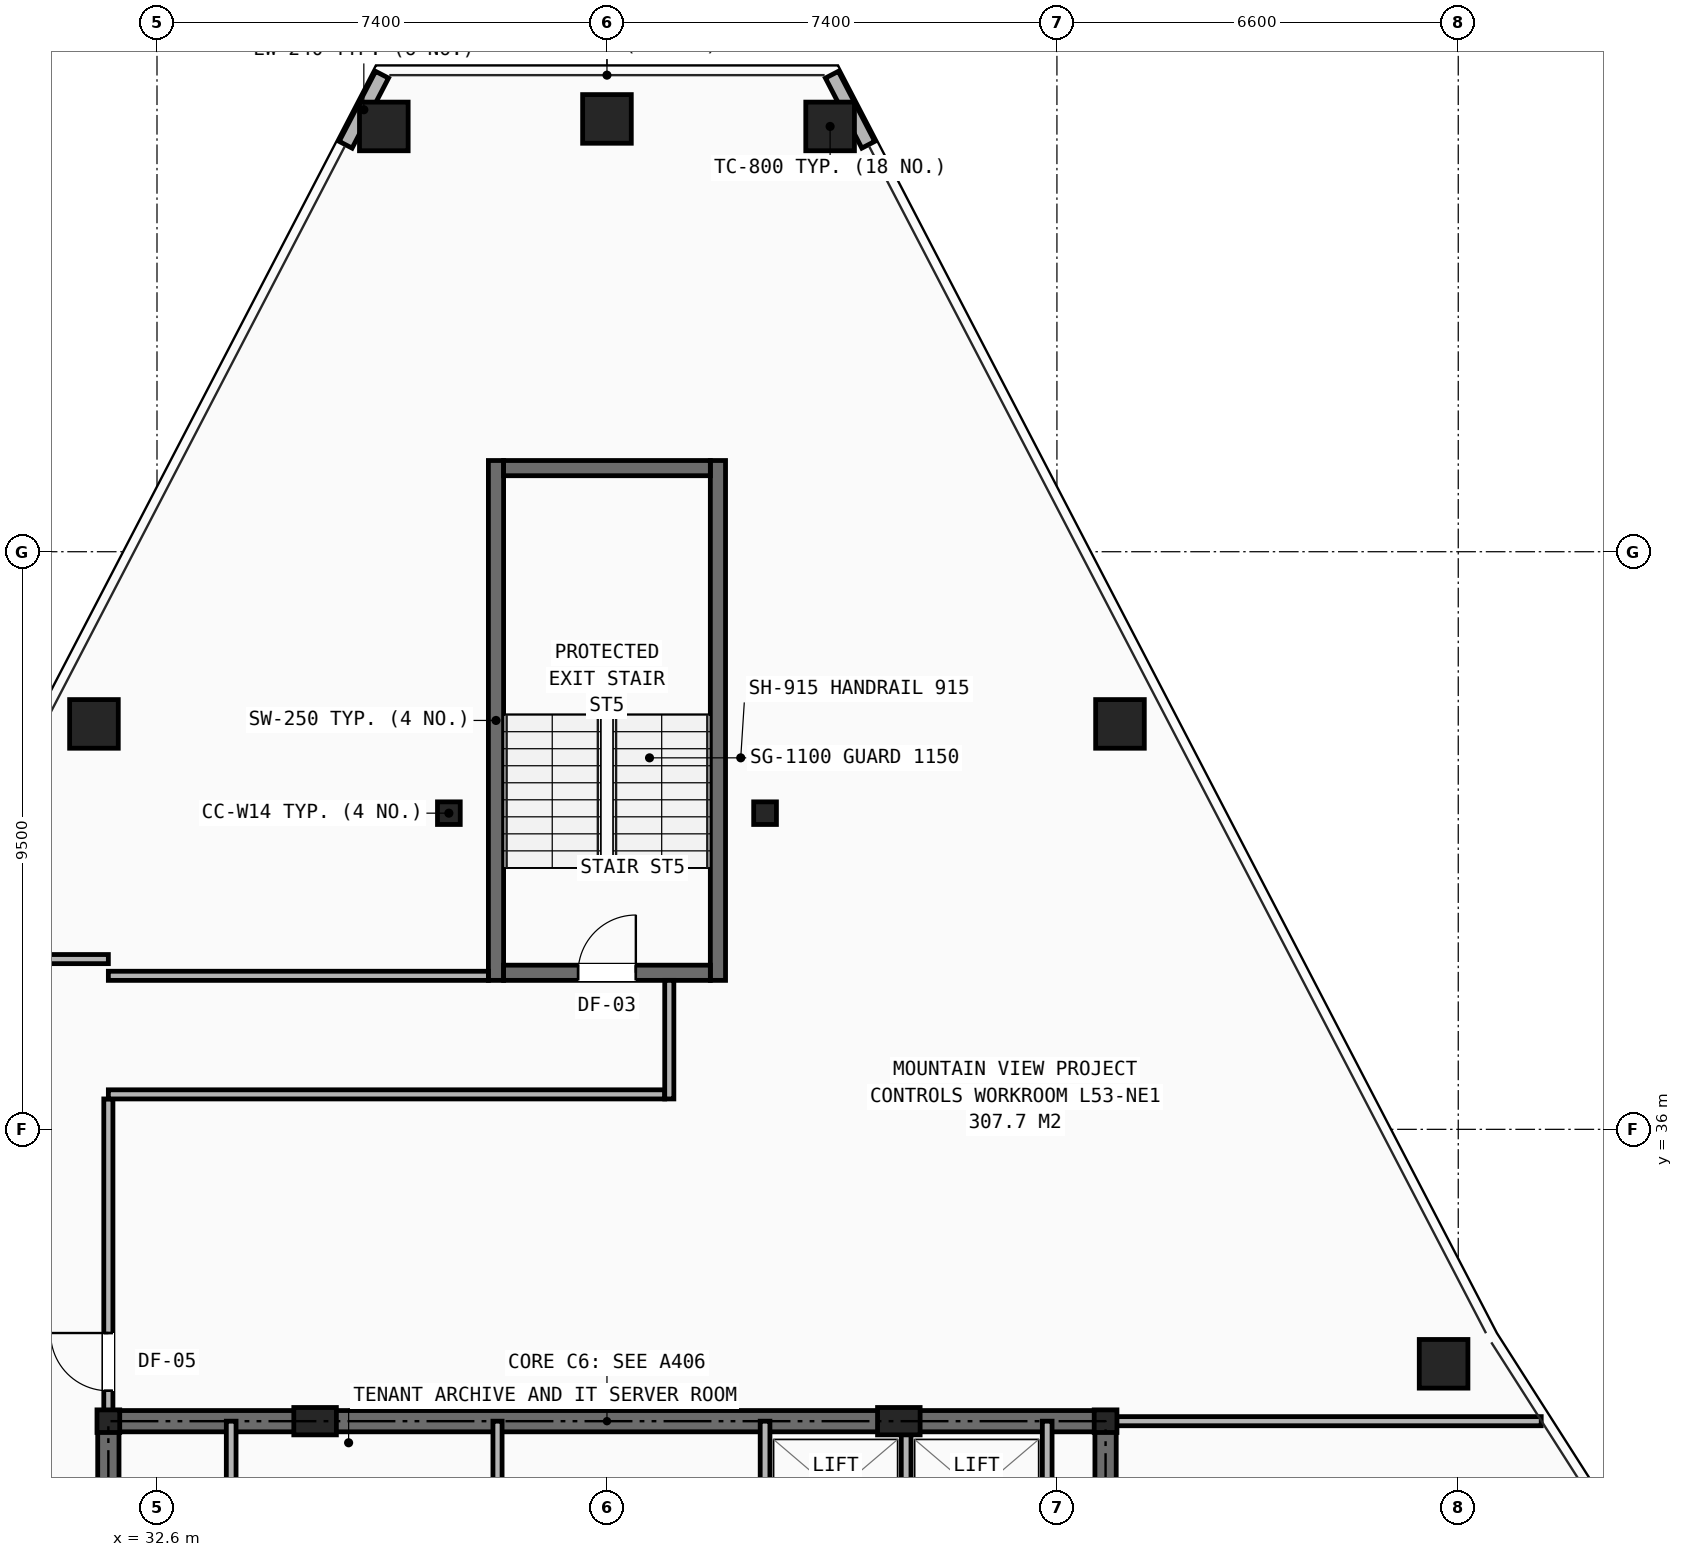
"""IFC4 building model, lengths in metres.
Left out: names, types, materials, properties, quantities, classifications, styles, units other than length and angle.
Written with IfcOpenShell. Run it as: python <this file> out.ifc"""

import sys

from ifc_helpers import new_model, si_unit, direction, frame, frame_2d, origin, origin_2d, place, context, subcontext, project, spatial, rectangle, hollow_rectangle, i_section, extrude, element, fill, save


model = new_model("IFC4")
c1 = context("Model", 3, precision=1e-05, world=origin(), true_north=direction((0.0, 1.0)))
c2 = subcontext(c1, "Body", "Model", "MODEL_VIEW")
j1 = project(units=[si_unit("LENGTHUNIT", "METRE"), si_unit("PLANEANGLEUNIT", "RADIAN")], contexts=[c1])
p1 = place(None, origin())
s1 = spatial("IfcSite", under=j1, at=p1, CompositionType="ELEMENT")
p2 = place(p1, origin())
s2 = spatial("IfcBuilding", under=s1, at=p2, CompositionType="ELEMENT")
p3 = place(p2, frame((0.0, 0.0, 186.15)))
s3 = spatial("IfcBuildingStorey", under=s2, at=p3, CompositionType="ELEMENT", Elevation=186.15)
for number, where, z_axis, x_axis in (
    (1, (31.8, 31.2, 0.0), (0.0, 0.0, 1.0), (1.0, 0.0, 0.0)),
    (2, (48.2, 31.2, 0.0), (0.0, 0.0, 1.0), (1.0, 0.0, 0.0)),
    (3, (37.4, 41.2, 0.0), (0.0, 0.0, 1.0), (1.0, 0.0, 0.0)),
    (4, (42.6, 41.2, 0.0), (0.0, 0.0, 1.0), (1.0, 0.0, 0.0)),
):
    element("IfcColumn", number, at=place(p3, frame(where, z_axis=z_axis, x_axis=x_axis)), inside=s3, PredefinedType="COLUMN", context=c2, shape_type="SweptSolid", body=[
        extrude(i_section(OverallWidth=0.374, OverallDepth=0.372, WebThickness=0.016, FlangeThickness=0.026, at=origin_2d()), origin(), (0.0, 0.0, 1.0), 3.45),
    ])
for number, where, z_axis, x_axis in (
    (5, (35.2, 31.2, 0.0), (0.0, 0.0, 1.0), (1.0, 0.0, 0.0)),
    (6, (44.8, 31.2, 0.0), (0.0, 0.0, 1.0), (1.0, 0.0, 0.0)),
):
    element("IfcColumn", number, at=place(p3, frame(where, z_axis=z_axis, x_axis=x_axis)), inside=s3, PredefinedType="PILASTER", context=c2, shape_type="SweptSolid", body=[
        extrude(rectangle(XDim=0.7, YDim=0.45, at=origin_2d()), origin(), (0.0, 0.0, 1.0), 3.45),
    ])
for number, where, z_axis, x_axis in (
    (7, (43.67, 52.495, 0.0), (0.0, 0.0, 1.0), (1.0, 0.0, 0.0)),
    (8, (40.0, 52.618, 0.0), (0.0, 0.0, 1.0), (1.0, 0.0, 0.0)),
    (9, (36.33, 52.495, 0.0), (0.0, 0.0, 1.0), (1.0, 0.0, 0.0)),
    (10, (31.563, 42.668, 0.0), (0.0, 0.0, 1.0), (1.0, 0.0, 0.0)),
    (11, (53.759, 32.144, 0.0), (0.0, 0.0, 1.0), (1.0, 0.0, 0.0)),
    (12, (48.437, 42.668, 0.0), (0.0, 0.0, 1.0), (1.0, 0.0, 0.0)),
):
    element("IfcColumn", number, at=place(p3, frame(where, z_axis=z_axis, x_axis=x_axis)), inside=s3, PredefinedType="COLUMN", context=c2, shape_type="SweptSolid", body=[
        extrude(hollow_rectangle(XDim=0.8, YDim=0.8, WallThickness=0.055, at=origin_2d()), origin(), (0.0, 0.0, 1.0), 3.45),
    ])
for number, where, z_axis, x_axis in (
    (13, (36.301, 53.345, 0.0), (0.0, 0.0, 1.0), (-0.461, -0.887, 0.0)),
    (14, (44.298, 52.193, 0.0), (0.0, 0.0, 1.0), (-0.461, 0.887, 0.0)),
):
    element("IfcWall", number, at=place(p3, frame(where, z_axis=z_axis, x_axis=x_axis)), inside=s3, PredefinedType="SHEAR", context=c2, shape_type="SweptSolid", body=[
        extrude(rectangle(XDim=1.299, YDim=0.24, at=frame_2d((0.649, 0.0))), origin(), (0.0, 0.0, 1.0), 2.583),
    ])
p4 = place(p3, frame((31.8, 31.2, 0.0), z_axis=(0.0, 0.0, 1.0), x_axis=(1.0, 0.0, 0.0)))
e15 = element("IfcWall", 15, at=p4, inside=s3, PredefinedType="SHEAR", context=c2, shape_type="SweptSolid", body=[
    extrude(rectangle(XDim=16.4, YDim=0.35, at=frame_2d((8.2, 0.0))), origin(), (0.0, 0.0, 1.0), 3.21),
])
p5 = place(p3, frame((31.8, 16.4, 0.0), z_axis=(0.0, 0.0, 1.0), x_axis=(0.0, 1.0, 0.0)))
e16 = element("IfcWall", 16, at=p5, inside=s3, PredefinedType="SHEAR", context=c2, shape_type="SweptSolid", body=[
    extrude(rectangle(XDim=14.8, YDim=0.35, at=frame_2d((7.4, 0.0))), origin(), (0.0, 0.0, 1.0), 3.21),
])
p6 = place(p5, frame((11.0, 0.0, 0.0)))
e17 = element("IfcOpeningElement", 17, at=p6, cuts=e16, PredefinedType="OPENING", context=c2, shape_type="SweptSolid", body=[
    extrude(rectangle(XDim=1.1, YDim=2.15, at=frame_2d((0.55, 1.075))), frame((0.0, 0.185, 0.0), z_axis=(0.0, -1.0, 0.0), x_axis=(1.0, 0.0, 0.0)), (0.0, 0.0, 1.0), 0.37),
])
p7 = place(p3, frame((48.2, 16.4, 0.0), z_axis=(0.0, 0.0, 1.0), x_axis=(0.0, 1.0, 0.0)))
e18 = element("IfcWall", 18, at=p7, inside=s3, PredefinedType="SHEAR", context=c2, shape_type="SweptSolid", body=[
    extrude(rectangle(XDim=14.8, YDim=0.35, at=frame_2d((7.4, 0.0))), origin(), (0.0, 0.0, 1.0), 3.21),
])
p8 = place(p7, frame((11.0, 0.0, 0.0)))
e19 = element("IfcOpeningElement", 19, at=p8, cuts=e18, PredefinedType="OPENING", context=c2, shape_type="SweptSolid", body=[
    extrude(rectangle(XDim=1.1, YDim=2.15, at=frame_2d((0.55, 1.075))), frame((0.0, 0.185, 0.0), z_axis=(0.0, -1.0, 0.0), x_axis=(1.0, 0.0, 0.0)), (0.0, 0.0, 1.0), 0.37),
])
p9 = place(p3, frame((33.82, 29.02, 0.0), z_axis=(0.0, 0.0, 1.0), x_axis=(0.0, 1.0, 0.0)))
e20 = element("IfcWall", 20, at=p9, inside=s3, PredefinedType="SOLIDWALL", context=c2, shape_type="SweptSolid", body=[
    extrude(rectangle(XDim=2.18, YDim=0.16, at=frame_2d((1.09, 0.0))), origin(), (0.0, 0.0, 1.0), 2.665),
])
p10 = place(p3, frame((38.2, 29.02, 0.0), z_axis=(0.0, 0.0, 1.0), x_axis=(0.0, 1.0, 0.0)))
e21 = element("IfcWall", 21, at=p10, inside=s3, PredefinedType="PARTITIONING", context=c2, shape_type="SweptSolid", body=[
    extrude(rectangle(XDim=2.18, YDim=0.15, at=frame_2d((1.09, 0.0))), origin(), (0.0, 0.0, 1.0), 2.665),
])
for number, where, z_axis, x_axis in (
    (22, (42.6, 29.02, 0.0), (0.0, 0.0, 1.0), (0.0, 1.0, 0.0)),
    (23, (44.92, 29.02, 0.0), (0.0, 0.0, 1.0), (0.0, 1.0, 0.0)),
    (24, (47.24, 29.02, 0.0), (0.0, 0.0, 1.0), (0.0, 1.0, 0.0)),
):
    element("IfcWall", number, at=place(p3, frame(where, z_axis=z_axis, x_axis=x_axis)), inside=s3, PredefinedType="SOLIDWALL", context=c2, shape_type="SweptSolid", body=[
        extrude(rectangle(XDim=2.18, YDim=0.16, at=frame_2d((1.09, 0.0))), origin(), (0.0, 0.0, 1.0), 2.665),
    ])
p11 = place(p3, frame((31.8, 31.2, 0.0), z_axis=(0.0, 0.0, 1.0), x_axis=(0.0, 1.0, 0.0)))
e25 = element("IfcWall", 25, at=p11, inside=s3, PredefinedType="PARTITIONING", context=c2, shape_type="SweptSolid", body=[
    extrude(rectangle(XDim=5.3, YDim=0.15, at=frame_2d((2.65, 0.0))), origin(), (0.0, 0.0, 1.0), 2.252),
])
p12 = place(p11, frame((0.5, 0.0, 0.0)))
e26 = element("IfcOpeningElement", 26, at=p12, cuts=e25, PredefinedType="OPENING", context=c2, shape_type="SweptSolid", body=[
    extrude(rectangle(XDim=0.95, YDim=2.1, at=frame_2d((0.475, 1.05))), frame((0.0, 0.085, 0.0), z_axis=(0.0, -1.0, 0.0), x_axis=(1.0, 0.0, 0.0)), (0.0, 0.0, 1.0), 0.17),
])
p13 = place(p3, frame((29.6, 38.8, 0.0), z_axis=(0.0, 0.0, 1.0), x_axis=(1.0, 0.0, 0.0)))
e27 = element("IfcWall", 27, at=p13, inside=s3, PredefinedType="PARTITIONING", context=c2, shape_type="SweptSolid", body=[
    extrude(rectangle(XDim=2.2, YDim=0.15, at=frame_2d((1.1, 0.0))), origin(), (0.0, 0.0, 1.0), 2.589),
])
p14 = place(p3, frame((48.2, 31.2, 0.0), z_axis=(0.0, 0.0, 1.0), x_axis=(1.0, 0.0, 0.0)))
e28 = element("IfcWall", 28, at=p14, inside=s3, PredefinedType="PARTITIONING", context=c2, shape_type="SweptSolid", body=[
    extrude(rectangle(XDim=7.165, YDim=0.15, at=frame_2d((3.582, 0.0))), origin(), (0.0, 0.0, 1.0), 2.252),
])
for number, where, z_axis, x_axis in (
    (29, (38.175, 38.45, 0.0), (0.0, 0.0, 1.0), (0.0, 1.0, 0.0)),
    (30, (41.825, 38.45, 0.0), (0.0, 0.0, 1.0), (0.0, 1.0, 0.0)),
):
    element("IfcWall", number, at=place(p3, frame(where, z_axis=z_axis, x_axis=x_axis)), inside=s3, PredefinedType="SHEAR", context=c2, shape_type="SweptSolid", body=[
        extrude(rectangle(XDim=8.55, YDim=0.25, at=frame_2d((4.275, 0.0))), origin(), (0.0, 0.0, 1.0), 3.21),
    ])
p15 = place(p3, frame((38.3, 38.575, 0.0), z_axis=(0.0, 0.0, 1.0), x_axis=(1.0, 0.0, 0.0)))
e31 = element("IfcWall", 31, at=p15, inside=s3, PredefinedType="SHEAR", context=c2, shape_type="SweptSolid", body=[
    extrude(rectangle(XDim=3.4, YDim=0.25, at=frame_2d((1.7, 0.0))), origin(), (0.0, 0.0, 1.0), 3.21),
])
p16 = place(p15, frame((1.225, 0.0, 0.0)))
e32 = element("IfcOpeningElement", 32, at=p16, cuts=e31, PredefinedType="OPENING", context=c2, shape_type="SweptSolid", body=[
    extrude(rectangle(XDim=0.95, YDim=2.1, at=frame_2d((0.475, 1.05))), frame((0.0, 0.135, 0.0), z_axis=(0.0, -1.0, 0.0), x_axis=(1.0, 0.0, 0.0)), (0.0, 0.0, 1.0), 0.27),
])
p17 = place(p3, frame((38.3, 46.875, 0.0), z_axis=(0.0, 0.0, 1.0), x_axis=(1.0, 0.0, 0.0)))
e33 = element("IfcWall", 33, at=p17, inside=s3, PredefinedType="SHEAR", context=c2, shape_type="SweptSolid", body=[
    extrude(rectangle(XDim=3.4, YDim=0.25, at=frame_2d((1.7, 0.0))), origin(), (0.0, 0.0, 1.0), 3.21),
])
p18 = place(p3, frame((31.8, 36.575, 0.0), z_axis=(0.0, 0.0, 1.0), x_axis=(1.0, 0.0, 0.0)))
e34 = element("IfcWall", 34, at=p18, inside=s3, PredefinedType="PARTITIONING", context=c2, shape_type="SweptSolid", body=[
    extrude(rectangle(XDim=9.15, YDim=0.15, at=frame_2d((4.575, 0.0))), origin(), (0.0, 0.0, 1.0), 3.21),
])
p19 = place(p3, frame((31.8, 38.525, 0.0), z_axis=(0.0, 0.0, 1.0), x_axis=(1.0, 0.0, 0.0)))
e35 = element("IfcWall", 35, at=p19, inside=s3, PredefinedType="PARTITIONING", context=c2, shape_type="SweptSolid", body=[
    extrude(rectangle(XDim=6.25, YDim=0.15, at=frame_2d((3.125, 0.0))), origin(), (0.0, 0.0, 1.0), 2.793),
])
p20 = place(p3, frame((41.025, 36.5, 0.0), z_axis=(0.0, 0.0, 1.0), x_axis=(0.0, 1.0, 0.0)))
e36 = element("IfcWall", 36, at=p20, inside=s3, PredefinedType="PARTITIONING", context=c2, shape_type="SweptSolid", body=[
    extrude(rectangle(XDim=1.95, YDim=0.15, at=frame_2d((0.975, 0.0))), origin(), (0.0, 0.0, 1.0), 3.21),
])
p21 = place(p12, origin())
e37 = element("IfcDoor", 37, at=p21, inside=s3, OperationType="SINGLE_SWING_RIGHT", PredefinedType="DOOR", context=c2, shape_type="SweptSolid", body=[
    extrude(rectangle(XDim=0.95, YDim=2.1, at=frame_2d((0.475, 1.05))), frame((0.0, 0.025, 0.0), z_axis=(0.0, -1.0, 0.0), x_axis=(1.0, 0.0, 0.0)), (0.0, 0.0, 1.0), 0.05),
])
fill(e26, e37)
p22 = place(p16, origin())
e38 = element("IfcDoor", 38, at=p22, inside=s3, OperationType="SINGLE_SWING_RIGHT", PredefinedType="DOOR", context=c2, shape_type="SweptSolid", body=[
    extrude(rectangle(XDim=0.95, YDim=2.1, at=frame_2d((0.475, 1.05))), frame((0.0, 0.025, 0.0), z_axis=(0.0, -1.0, 0.0), x_axis=(1.0, 0.0, 0.0)), (0.0, 0.0, 1.0), 0.05),
])
fill(e32, e38)
save(model, sys.argv[1])
